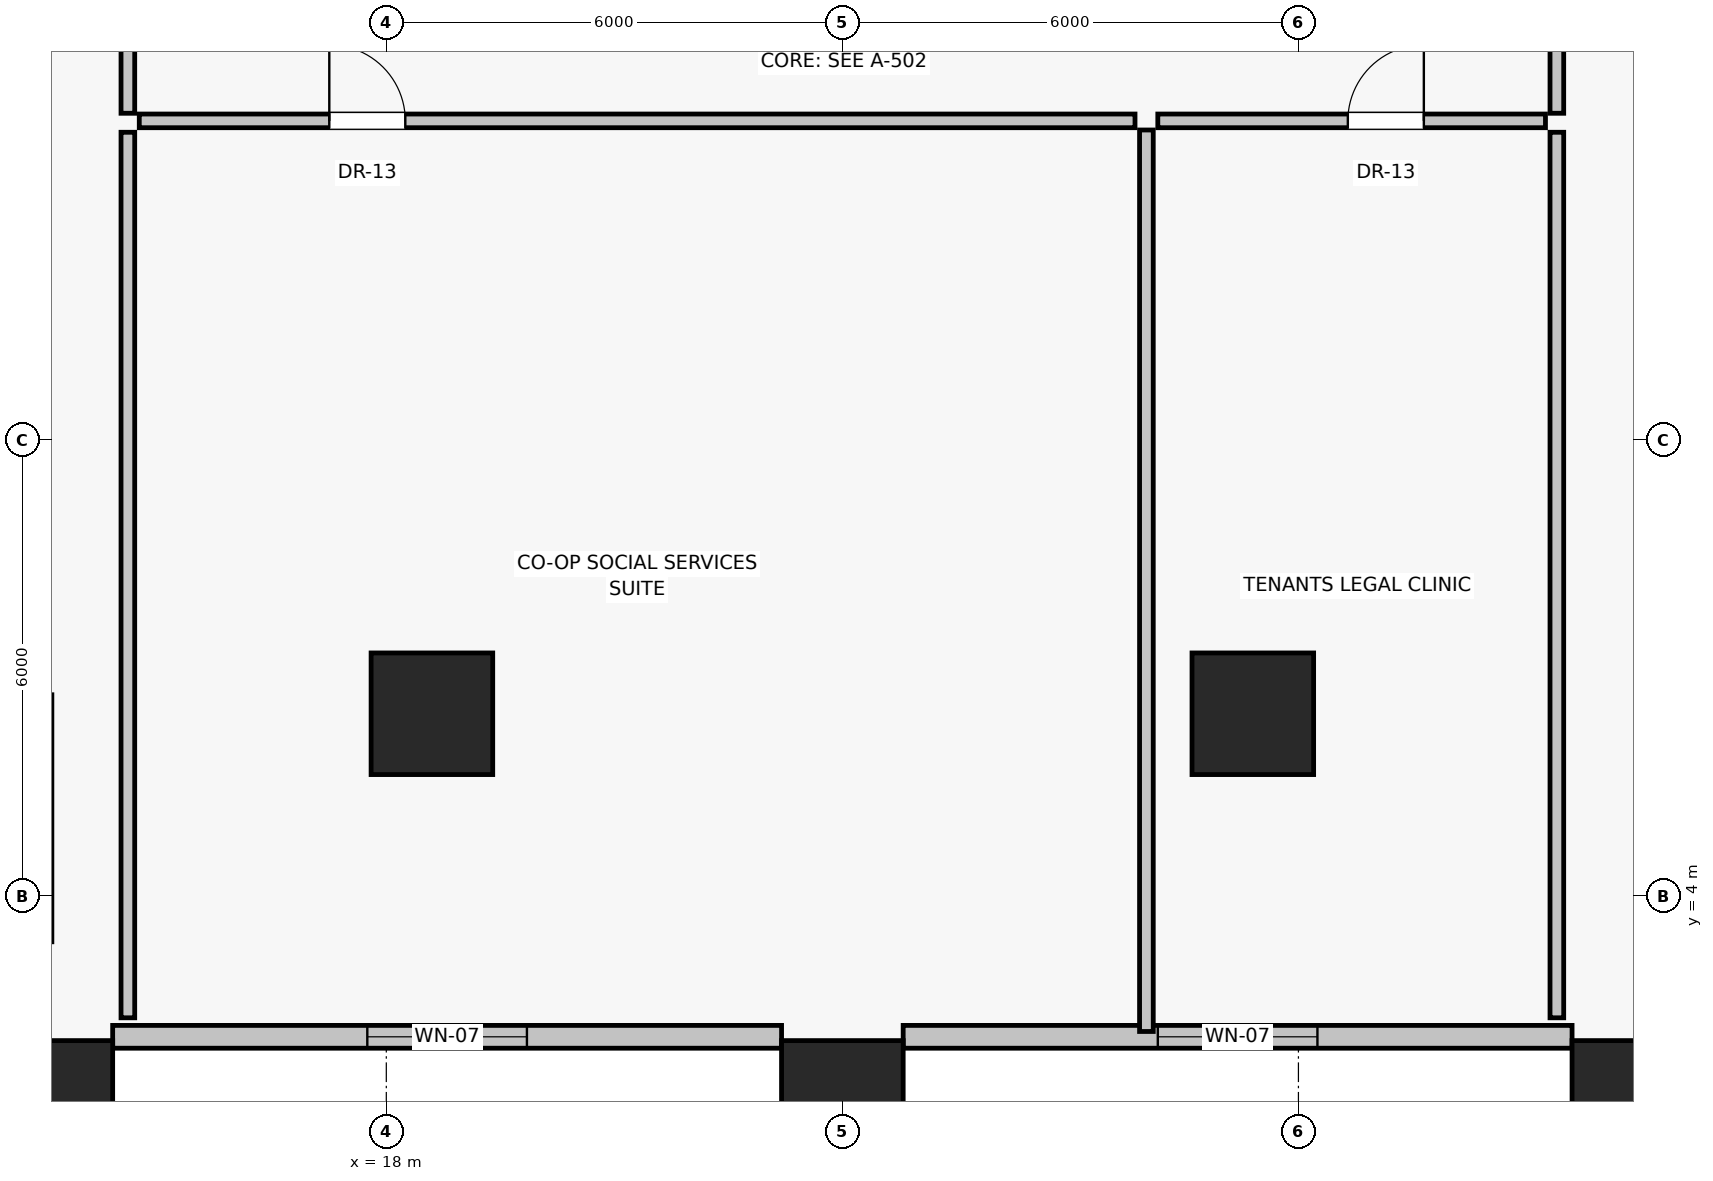
"""IFC4 building model, lengths in metres.
Left out: names, types, materials, properties, quantities, classifications, styles, units other than length and angle.
Written with IfcOpenShell. Run it as: python <this file> out.ifc"""

import sys

from ifc_helpers import new_model, si_unit, direction, frame, frame_2d, origin, origin_2d, place, context, subcontext, project, spatial, rectangle, extrude, source, transform, mapped, element, fill, save


model = new_model("IFC4")
c1 = context("Model", 3, precision=1e-05, world=origin(), true_north=direction((0.0, 1.0)))
c2 = subcontext(c1, "Body", "Model", "MODEL_VIEW")
j1 = project(units=[si_unit("LENGTHUNIT", "METRE"), si_unit("PLANEANGLEUNIT", "RADIAN")], contexts=[c1])
p1 = place(None, origin())
s1 = spatial("IfcSite", under=j1, at=p1, CompositionType="ELEMENT")
p2 = place(p1, origin())
s2 = spatial("IfcBuilding", under=s1, at=p2, CompositionType="ELEMENT")
p3 = place(p2, frame((0.0, 0.0, 9.6)))
s3 = spatial("IfcBuildingStorey", under=s2, at=p3, CompositionType="ELEMENT", Elevation=9.6)
for number, where, z_axis, x_axis in (
    (1, (13.6, 1.3, 0.0), (0.0, 0.0, 1.0), (1.0, 0.0, 0.0)),
    (2, (24.0, 1.3, 0.0), (0.0, 0.0, 1.0), (1.0, 0.0, 0.0)),
    (3, (34.4, 1.3, 0.0), (0.0, 0.0, 1.0), (1.0, 0.0, 0.0)),
    (4, (18.6, 6.4, 0.0), (0.0, 0.0, 1.0), (1.0, 0.0, 0.0)),
    (5, (29.4, 6.4, 0.0), (0.0, 0.0, 1.0), (1.0, 0.0, 0.0)),
):
    element("IfcColumn", number, at=place(p3, frame(where, z_axis=z_axis, x_axis=x_axis)), inside=s3, PredefinedType="COLUMN", context=c2, shape_type="SweptSolid", body=[
        extrude(rectangle(XDim=1.6, YDim=1.6, at=origin_2d()), origin(), (0.0, 0.0, 1.0), 4.4),
    ])
p4 = place(p3, frame((14.4, 2.15, 0.0), z_axis=(0.0, 0.0, 1.0), x_axis=(1.0, 0.0, 0.0)))
e6 = element("IfcWall", 6, at=p4, inside=s3, PredefinedType="SOLIDWALL", context=c2, shape_type="SweptSolid", body=[
    extrude(rectangle(XDim=8.8, YDim=0.3, at=frame_2d((4.4, 0.0))), origin(), (0.0, 0.0, 1.0), 3.0),
])
p5 = place(p4, frame((3.35, 0.0, 0.85)))
e7 = element("IfcOpeningElement", 7, at=p5, cuts=e6, PredefinedType="OPENING", context=c2, shape_type="SweptSolid", body=[
    extrude(rectangle(XDim=2.1, YDim=1.75, at=frame_2d((1.05, 0.875))), frame((0.0, 0.16, 0.0), z_axis=(0.0, -1.0, 0.0), x_axis=(1.0, 0.0, 0.0)), (0.0, 0.0, 1.0), 0.32),
])
p6 = place(p3, frame((24.8, 2.15, 0.0), z_axis=(0.0, 0.0, 1.0), x_axis=(1.0, 0.0, 0.0)))
e8 = element("IfcWall", 8, at=p6, inside=s3, PredefinedType="SOLIDWALL", context=c2, shape_type="SweptSolid", body=[
    extrude(rectangle(XDim=8.8, YDim=0.3, at=frame_2d((4.4, 0.0))), origin(), (0.0, 0.0, 1.0), 3.0),
])
p7 = place(p6, frame((3.35, 0.0, 0.85)))
e9 = element("IfcOpeningElement", 9, at=p7, cuts=e8, PredefinedType="OPENING", context=c2, shape_type="SweptSolid", body=[
    extrude(rectangle(XDim=2.1, YDim=1.75, at=frame_2d((1.05, 0.875))), frame((0.0, 0.16, 0.0), z_axis=(0.0, -1.0, 0.0), x_axis=(1.0, 0.0, 0.0)), (0.0, 0.0, 1.0), 0.32),
])
p8 = place(p3, frame((14.6, 14.3, 0.0), z_axis=(0.0, 0.0, 1.0), x_axis=(0.0, 1.0, 0.0)))
e10 = element("IfcWall", 10, at=p8, inside=s3, PredefinedType="PARTITIONING", context=c2, shape_type="SweptSolid", body=[
    extrude(rectangle(XDim=6.55, YDim=0.18, at=frame_2d((3.275, 0.0))), origin(), (0.0, 0.0, 1.0), 4.1),
])
p9 = place(p8, frame((2.5, 0.0, 0.0)))
e11 = element("IfcOpeningElement", 11, at=p9, cuts=e10, PredefinedType="OPENING", context=c2, shape_type="SweptSolid", body=[
    extrude(rectangle(XDim=1.0, YDim=2.01, at=frame_2d((0.5, 1.005))), frame((0.0, 0.1, 0.0), z_axis=(0.0, -1.0, 0.0), x_axis=(1.0, 0.0, 0.0)), (0.0, 0.0, 1.0), 0.2),
])
p10 = place(p3, frame((14.6, 2.4, 0.0), z_axis=(0.0, 0.0, 1.0), x_axis=(0.0, 1.0, 0.0)))
e12 = element("IfcWall", 12, at=p10, inside=s3, PredefinedType="PARTITIONING", context=c2, shape_type="SweptSolid", body=[
    extrude(rectangle(XDim=11.65, YDim=0.18, at=frame_2d((5.825, 0.0))), origin(), (0.0, 0.0, 1.0), 4.1),
])
p11 = place(p3, frame((14.75, 14.2, 0.0), z_axis=(0.0, 0.0, 1.0), x_axis=(1.0, 0.0, 0.0)))
e13 = element("IfcWall", 13, at=p11, inside=s3, PredefinedType="PARTITIONING", context=c2, shape_type="SweptSolid", body=[
    extrude(rectangle(XDim=13.1, YDim=0.18, at=frame_2d((6.55, 0.0))), origin(), (0.0, 0.0, 1.0), 4.1),
])
p12 = place(p11, frame((2.5, 0.0, 0.0)))
e14 = element("IfcOpeningElement", 14, at=p12, cuts=e13, PredefinedType="OPENING", context=c2, shape_type="SweptSolid", body=[
    extrude(rectangle(XDim=1.0, YDim=2.01, at=frame_2d((0.5, 1.005))), frame((0.0, 0.1, 0.0), z_axis=(0.0, -1.0, 0.0), x_axis=(1.0, 0.0, 0.0)), (0.0, 0.0, 1.0), 0.2),
])
p13 = place(p3, frame((28.15, 14.2, 0.0), z_axis=(0.0, 0.0, 1.0), x_axis=(1.0, 0.0, 0.0)))
e15 = element("IfcWall", 15, at=p13, inside=s3, PredefinedType="PARTITIONING", context=c2, shape_type="SweptSolid", body=[
    extrude(rectangle(XDim=5.1, YDim=0.18, at=frame_2d((2.55, 0.0))), origin(), (0.0, 0.0, 1.0), 4.1),
])
p14 = place(p13, frame((2.5, 0.0, 0.0)))
e16 = element("IfcOpeningElement", 16, at=p14, cuts=e15, PredefinedType="OPENING", context=c2, shape_type="SweptSolid", body=[
    extrude(rectangle(XDim=1.0, YDim=2.01, at=frame_2d((0.5, 1.005))), frame((0.0, 0.1, 0.0), z_axis=(0.0, -1.0, 0.0), x_axis=(1.0, 0.0, 0.0)), (0.0, 0.0, 1.0), 0.2),
])
p15 = place(p3, frame((28.0, 2.22, 0.0), z_axis=(0.0, 0.0, 1.0), x_axis=(0.0, 1.0, 0.0)))
e17 = element("IfcWall", 17, at=p15, inside=s3, PredefinedType="PARTITIONING", context=c2, shape_type="SweptSolid", body=[
    extrude(rectangle(XDim=11.86, YDim=0.18, at=frame_2d((5.93, 0.0))), origin(), (0.0, 0.0, 1.0), 4.1),
])
p16 = place(p3, frame((33.4, 2.4, 0.0), z_axis=(0.0, 0.0, 1.0), x_axis=(0.0, 1.0, 0.0)))
e18 = element("IfcWall", 18, at=p16, inside=s3, PredefinedType="PARTITIONING", context=c2, shape_type="SweptSolid", body=[
    extrude(rectangle(XDim=11.65, YDim=0.18, at=frame_2d((5.825, 0.0))), origin(), (0.0, 0.0, 1.0), 4.1),
])
p17 = place(p3, frame((33.4, 14.3, 0.0), z_axis=(0.0, 0.0, 1.0), x_axis=(0.0, 1.0, 0.0)))
e19 = element("IfcWall", 19, at=p17, inside=s3, PredefinedType="PARTITIONING", context=c2, shape_type="SweptSolid", body=[
    extrude(rectangle(XDim=13.05, YDim=0.18, at=frame_2d((6.525, 0.0))), origin(), (0.0, 0.0, 1.0), 4.1),
])
p18 = place(p17, frame((2.2, 0.0, 0.0)))
e20 = element("IfcOpeningElement", 20, at=p18, cuts=e19, PredefinedType="OPENING", context=c2, shape_type="SweptSolid", body=[
    extrude(rectangle(XDim=1.0, YDim=2.01, at=frame_2d((0.5, 1.005))), frame((0.0, 0.1, 0.0), z_axis=(0.0, -1.0, 0.0), x_axis=(1.0, 0.0, 0.0)), (0.0, 0.0, 1.0), 0.2),
])
m1 = source(origin(), c2, "Body", "SweptSolid", [
    extrude(rectangle(XDim=2.1, YDim=1.75, at=frame_2d((1.05, 0.875))), frame((0.0, 0.03, 0.0), z_axis=(0.0, -1.0, 0.0), x_axis=(1.0, 0.0, 0.0)), (0.0, 0.0, 1.0), 0.06),
])
p19 = place(p5, origin())
e21 = element("IfcWindow", 21, at=p19, inside=s3, PartitioningType="DOUBLE_PANEL_VERTICAL", PredefinedType="WINDOW", context=c2, shape_type="MappedRepresentation", body=[
    mapped(m1, transform((0.0, 0.0, 0.0), scale=1.0)),
])
fill(e7, e21)
p20 = place(p7, origin())
e22 = element("IfcWindow", 22, at=p20, inside=s3, PartitioningType="DOUBLE_PANEL_VERTICAL", PredefinedType="WINDOW", context=c2, shape_type="MappedRepresentation", body=[
    mapped(m1, transform((0.0, 0.0, 0.0), scale=1.0)),
])
fill(e9, e22)
m2 = source(origin(), c2, "Body", "SweptSolid", [
    extrude(rectangle(XDim=1.0, YDim=2.01, at=frame_2d((0.5, 1.005))), frame((0.0, 0.025, 0.0), z_axis=(0.0, -1.0, 0.0), x_axis=(1.0, 0.0, 0.0)), (0.0, 0.0, 1.0), 0.05),
])
p21 = place(p12, origin())
e23 = element("IfcDoor", 23, at=p21, inside=s3, OperationType="SINGLE_SWING_LEFT", PredefinedType="DOOR", context=c2, shape_type="MappedRepresentation", body=[
    mapped(m2, transform((0.0, 0.0, 0.0), scale=1.0)),
])
fill(e14, e23)
p22 = place(p14, origin())
e24 = element("IfcDoor", 24, at=p22, inside=s3, OperationType="SINGLE_SWING_RIGHT", PredefinedType="DOOR", context=c2, shape_type="MappedRepresentation", body=[
    mapped(m2, transform((0.0, 0.0, 0.0), scale=1.0)),
])
fill(e16, e24)
save(model, sys.argv[1])
